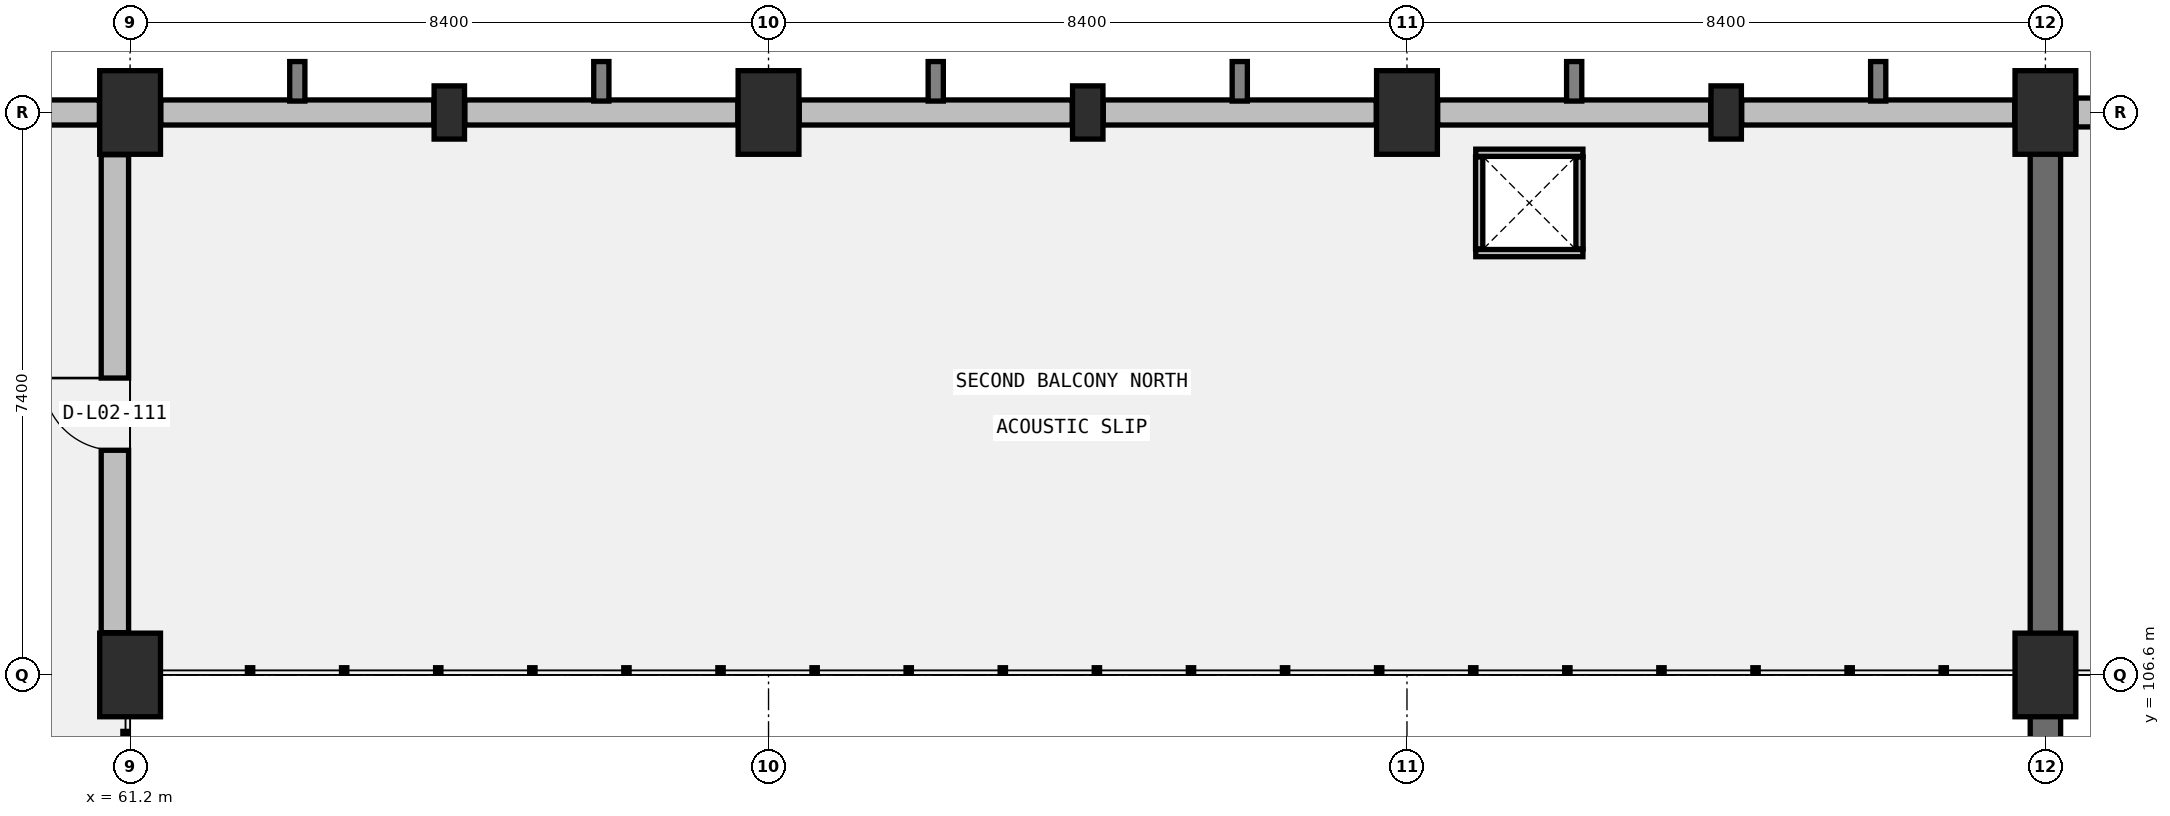
"""IFC4 building model, lengths in metres.
Left out: names, types, materials, properties, quantities, classifications, styles, units other than length and angle.
Written with IfcOpenShell. Run it as: python <this file> out.ifc"""

import sys

from ifc_helpers import new_model, si_unit, direction, frame, frame_2d, origin, origin_2d, place, context, subcontext, project, spatial, rectangle, extrude, element, fill, save


model = new_model("IFC4")
c1 = context("Model", 3, precision=1e-05, world=origin(), true_north=direction((0.0, 1.0)))
c2 = subcontext(c1, "Body", "Model", "MODEL_VIEW")
j1 = project(units=[si_unit("LENGTHUNIT", "METRE"), si_unit("PLANEANGLEUNIT", "RADIAN")], contexts=[c1])
p1 = place(None, origin())
s1 = spatial("IfcSite", under=j1, at=p1, CompositionType="ELEMENT")
p2 = place(p1, origin())
s2 = spatial("IfcBuilding", under=s1, at=p2, CompositionType="ELEMENT")
p3 = place(p2, frame((0.0, 0.0, 10.0)))
s3 = spatial("IfcBuildingStorey", under=s2, at=p3, CompositionType="ELEMENT", Elevation=10.0)
for number, where, z_axis, x_axis in (
    (1, (61.2, 106.6, 0.0), (0.0, 0.0, 1.0), (1.0, 0.0, 0.0)),
    (2, (61.2, 114.0, 0.0), (0.0, 0.0, 1.0), (1.0, 0.0, 0.0)),
):
    element("IfcColumn", number, at=place(p3, frame(where, z_axis=z_axis, x_axis=x_axis)), inside=s3, PredefinedType="COLUMN", context=c2, shape_type="SweptSolid", body=[
        extrude(rectangle(XDim=0.8, YDim=1.1, at=origin_2d()), origin(), (0.0, 0.0, 1.0), 4.6),
    ])
p4 = place(p3, frame((65.4, 114.0, 0.0), z_axis=(0.0, 0.0, 1.0), x_axis=(1.0, 0.0, 0.0)))
e3 = element("IfcColumn", 3, at=p4, inside=s3, PredefinedType="PILASTER", context=c2, shape_type="SweptSolid", body=[
    extrude(rectangle(XDim=0.4, YDim=0.7, at=origin_2d()), origin(), (0.0, 0.0, 1.0), 4.6),
])
p5 = place(p3, frame((69.6, 114.0, 0.0), z_axis=(0.0, 0.0, 1.0), x_axis=(1.0, 0.0, 0.0)))
e4 = element("IfcColumn", 4, at=p5, inside=s3, PredefinedType="COLUMN", context=c2, shape_type="SweptSolid", body=[
    extrude(rectangle(XDim=0.8, YDim=1.1, at=origin_2d()), origin(), (0.0, 0.0, 1.0), 4.6),
])
p6 = place(p3, frame((73.8, 114.0, 0.0), z_axis=(0.0, 0.0, 1.0), x_axis=(1.0, 0.0, 0.0)))
e5 = element("IfcColumn", 5, at=p6, inside=s3, PredefinedType="PILASTER", context=c2, shape_type="SweptSolid", body=[
    extrude(rectangle(XDim=0.4, YDim=0.7, at=origin_2d()), origin(), (0.0, 0.0, 1.0), 4.6),
])
p7 = place(p3, frame((78.0, 114.0, 0.0), z_axis=(0.0, 0.0, 1.0), x_axis=(1.0, 0.0, 0.0)))
e6 = element("IfcColumn", 6, at=p7, inside=s3, PredefinedType="COLUMN", context=c2, shape_type="SweptSolid", body=[
    extrude(rectangle(XDim=0.8, YDim=1.1, at=origin_2d()), origin(), (0.0, 0.0, 1.0), 4.6),
])
p8 = place(p3, frame((82.2, 114.0, 0.0), z_axis=(0.0, 0.0, 1.0), x_axis=(1.0, 0.0, 0.0)))
e7 = element("IfcColumn", 7, at=p8, inside=s3, PredefinedType="PILASTER", context=c2, shape_type="SweptSolid", body=[
    extrude(rectangle(XDim=0.4, YDim=0.7, at=origin_2d()), origin(), (0.0, 0.0, 1.0), 4.6),
])
for number, where, z_axis, x_axis in (
    (8, (86.4, 106.6, 0.0), (0.0, 0.0, 1.0), (1.0, 0.0, 0.0)),
    (9, (86.4, 114.0, 0.0), (0.0, 0.0, 1.0), (1.0, 0.0, 0.0)),
):
    element("IfcColumn", number, at=place(p3, frame(where, z_axis=z_axis, x_axis=x_axis)), inside=s3, PredefinedType="COLUMN", context=c2, shape_type="SweptSolid", body=[
        extrude(rectangle(XDim=0.8, YDim=1.1, at=origin_2d()), origin(), (0.0, 0.0, 1.0), 4.6),
    ])
p9 = place(p3, frame((86.4, 84.5, 0.0), z_axis=(0.0, 0.0, 1.0), x_axis=(0.0, 1.0, 0.0)))
e10 = element("IfcWall", 10, at=p9, inside=s3, PredefinedType="SHEAR", context=c2, shape_type="SweptSolid", body=[
    extrude(rectangle(XDim=29.0, YDim=0.4, at=frame_2d((14.5, 0.0))), origin(), (0.0, 0.0, 1.0), 4.36),
])
p10 = place(p3, frame((57.204, 114.0, 0.0), z_axis=(0.0, 0.0, 1.0), x_axis=(1.0, 0.0, 0.0)))
e11 = element("IfcWall", 11, at=p10, inside=s3, PredefinedType="STANDARD", context=c2, shape_type="SweptSolid", body=[
    extrude(rectangle(XDim=3.592, YDim=0.33, at=frame_2d((1.796, 0.0))), origin(), (0.0, 0.0, 1.0), 3.628),
])
for number, where, z_axis, x_axis in (
    (12, (61.604, 114.0, 0.0), (0.0, 0.0, 1.0), (1.0, 0.0, 0.0)),
    (13, (65.604, 114.0, 0.0), (0.0, 0.0, 1.0), (1.0, 0.0, 0.0)),
    (14, (70.004, 114.0, 0.0), (0.0, 0.0, 1.0), (1.0, 0.0, 0.0)),
    (15, (74.004, 114.0, 0.0), (0.0, 0.0, 1.0), (1.0, 0.0, 0.0)),
    (16, (78.404, 114.0, 0.0), (0.0, 0.0, 1.0), (1.0, 0.0, 0.0)),
    (17, (82.404, 114.0, 0.0), (0.0, 0.0, 1.0), (1.0, 0.0, 0.0)),
):
    element("IfcWall", number, at=place(p3, frame(where, z_axis=z_axis, x_axis=x_axis)), inside=s3, PredefinedType="STANDARD", context=c2, shape_type="SweptSolid", body=[
        extrude(rectangle(XDim=3.592, YDim=0.33, at=frame_2d((1.796, 0.0))), origin(), (0.0, 0.0, 1.0), 3.628),
    ])
p11 = place(p3, frame((86.804, 114.0, 0.0), z_axis=(0.0, 0.0, 1.0), x_axis=(1.0, 0.0, 0.0)))
e18 = element("IfcWall", 18, at=p11, inside=s3, PredefinedType="STANDARD", context=c2, shape_type="SweptSolid", body=[
    extrude(rectangle(XDim=8.017, YDim=0.38, at=frame_2d((4.009, 0.0))), origin(), (0.0, 0.0, 1.0), 3.528),
])
for number, where, z_axis, x_axis in (
    (19, (78.905, 112.15, 0.0), (0.0, 0.0, 1.0), (1.0, 0.0, 0.0)),
    (20, (78.905, 113.47, 0.0), (0.0, 0.0, 1.0), (1.0, 0.0, 0.0)),
):
    element("IfcWall", number, at=place(p3, frame(where, z_axis=z_axis, x_axis=x_axis)), inside=s3, PredefinedType="PARTITIONING", context=c2, shape_type="SweptSolid", body=[
        extrude(rectangle(XDim=1.41, YDim=0.095, at=frame_2d((0.705, 0.0))), origin(), (0.0, 0.0, 1.0), 4.36),
    ])
for number, where, z_axis, x_axis in (
    (21, (78.95, 112.205, 0.0), (0.0, 0.0, 1.0), (0.0, 1.0, 0.0)),
    (22, (80.27, 112.205, 0.0), (0.0, 0.0, 1.0), (0.0, 1.0, 0.0)),
):
    element("IfcWall", number, at=place(p3, frame(where, z_axis=z_axis, x_axis=x_axis)), inside=s3, PredefinedType="PARTITIONING", context=c2, shape_type="SweptSolid", body=[
        extrude(rectangle(XDim=1.21, YDim=0.095, at=frame_2d((0.605, 0.0))), origin(), (0.0, 0.0, 1.0), 4.36),
    ])
p12 = place(p3, frame((61.0, 107.156, 0.0), z_axis=(0.0, 0.0, 1.0), x_axis=(0.0, 1.0, 0.0)))
e23 = element("IfcWall", 23, at=p12, inside=s3, PredefinedType="PARTITIONING", context=c2, shape_type="SweptSolid", body=[
    extrude(rectangle(XDim=6.288, YDim=0.36, at=frame_2d((3.144, 0.0))), origin(), (0.0, 0.0, 1.0), 3.74),
])
p13 = place(p12, frame((2.4, 0.0, 0.0)))
e24 = element("IfcOpeningElement", 24, at=p13, cuts=e23, PredefinedType="OPENING", context=c2, shape_type="SweptSolid", body=[
    extrude(rectangle(XDim=0.95, YDim=2.15, at=frame_2d((0.475, 1.075))), frame((0.0, 0.19, 0.0), z_axis=(0.0, -1.0, 0.0), x_axis=(1.0, 0.0, 0.0)), (0.0, 0.0, 1.0), 0.38),
])
p14 = place(p13, origin())
e25 = element("IfcDoor", 25, at=p14, inside=s3, OperationType="SINGLE_SWING_RIGHT", PredefinedType="DOOR", context=c2, shape_type="SweptSolid", body=[
    extrude(rectangle(XDim=0.95, YDim=2.15, at=frame_2d((0.475, 1.075))), frame((0.0, 0.025, 0.0), z_axis=(0.0, -1.0, 0.0), x_axis=(1.0, 0.0, 0.0)), (0.0, 0.0, 1.0), 0.05),
])
fill(e24, e25)
save(model, sys.argv[1])
